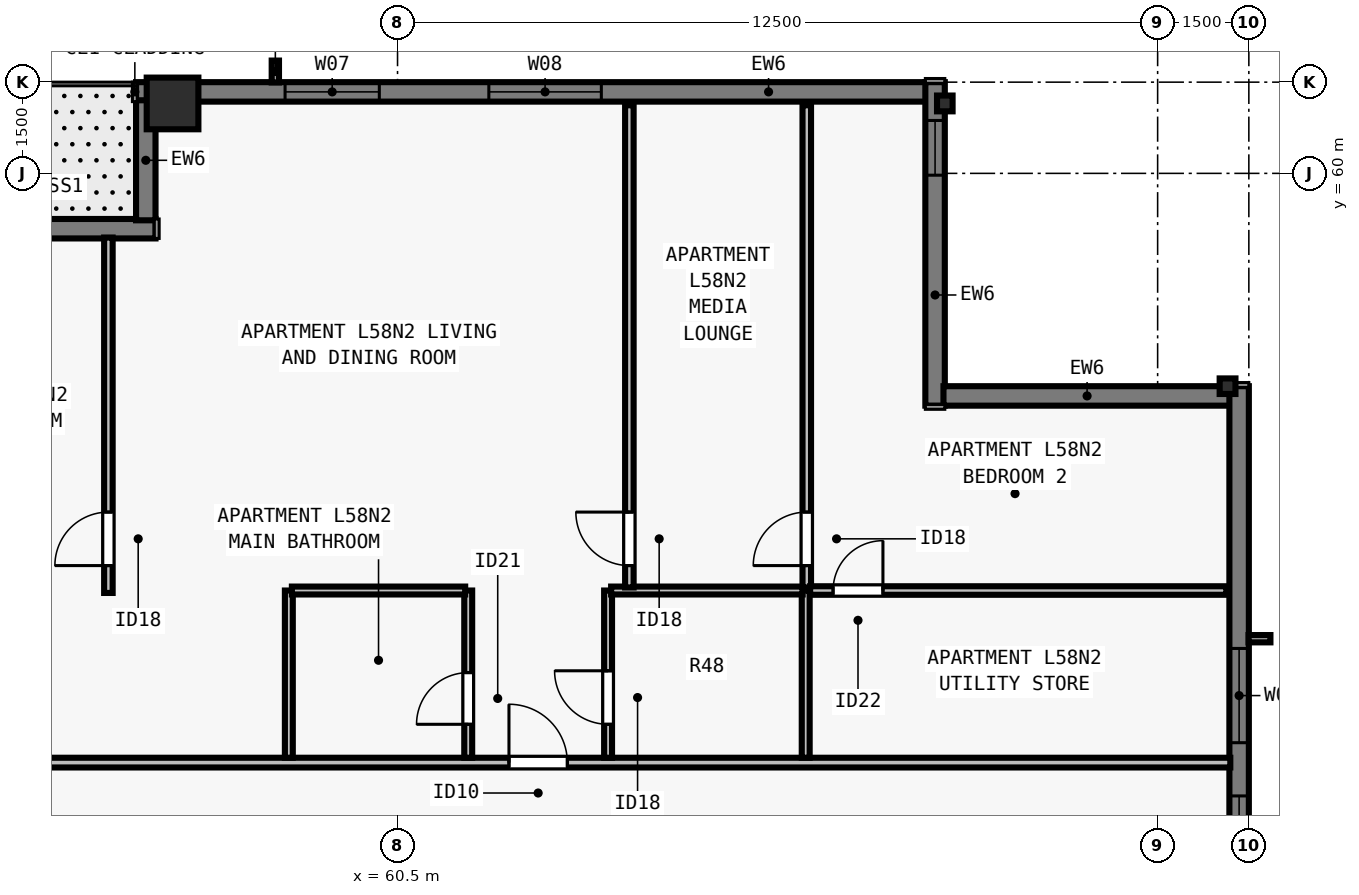
"""IFC4 building model, lengths in metres.
Left out: names, types, materials, properties, quantities, classifications, styles, units other than length and angle.
Written with IfcOpenShell. Run it as: python <this file> out.ifc"""

import sys

from ifc_helpers import new_model, si_unit, direction, frame, frame_2d, origin, origin_2d, place, context, subcontext, project, spatial, rectangle, i_section, extrude, element, fill, save


model = new_model("IFC4")
c1 = context("Model", 3, precision=1e-05, world=origin(), true_north=direction((0.0, 1.0)))
c2 = subcontext(c1, "Body", "Model", "MODEL_VIEW")
j1 = project(units=[si_unit("LENGTHUNIT", "METRE"), si_unit("PLANEANGLEUNIT", "RADIAN")], contexts=[c1])
p1 = place(None, origin())
s1 = spatial("IfcSite", under=j1, at=p1, CompositionType="ELEMENT")
p2 = place(p1, origin())
s2 = spatial("IfcBuilding", under=s1, at=p2, CompositionType="ELEMENT")
p3 = place(p2, frame((0.0, 0.0, 213.0)))
s3 = spatial("IfcBuildingStorey", under=s2, at=p3, CompositionType="ELEMENT", Elevation=213.0)
for number, where, z_axis, x_axis in (
    (1, (74.15, 56.5, 0.0), (0.0, 0.0, 1.0), (0.0, 1.0, 0.0)),
    (2, (69.5, 61.15, 0.0), (0.0, 0.0, 1.0), (1.0, 0.0, 0.0)),
):
    element("IfcColumn", number, at=place(p3, frame(where, z_axis=z_axis, x_axis=x_axis)), inside=s3, PredefinedType="COLUMN", context=c2, shape_type="SweptSolid", body=[
        extrude(i_section(OverallWidth=0.256, OverallDepth=0.26, WebThickness=0.01, FlangeThickness=0.017, FilletRadius=0.013, at=origin_2d()), origin(), (0.0, 0.0, 1.0), 3.5),
    ])
p4 = place(p3, frame((56.8, 61.15, 0.0), z_axis=(0.0, 0.0, 1.0), x_axis=(1.0, 0.0, 0.0)))
e3 = element("IfcColumn", 3, at=p4, inside=s3, PredefinedType="COLUMN", context=c2, shape_type="SweptSolid", body=[
    extrude(rectangle(XDim=0.85, YDim=0.85, at=origin_2d()), origin(), (0.0, 0.0, 1.0), 3.5),
])
p5 = place(p3, frame((56.2, 61.34, 0.0), z_axis=(0.0, 0.0, 1.0), x_axis=(1.0, 0.0, 0.0)))
e4 = element("IfcWall", 4, at=p5, inside=s3, PredefinedType="SOLIDWALL", context=c2, shape_type="SweptSolid", body=[
    extrude(rectangle(XDim=13.002, YDim=0.32, at=frame_2d((6.501, 0.0))), origin(), (0.0, 0.0, 1.0), 3.29),
])
p6 = place(p5, frame((2.45, 0.0, 0.8)))
e5 = element("IfcOpeningElement", 5, at=p6, cuts=e4, PredefinedType="OPENING", context=c2, shape_type="SweptSolid", body=[
    extrude(rectangle(XDim=1.55, YDim=1.678, at=frame_2d((0.775, 0.839))), frame((0.0, 0.17, 0.0), z_axis=(0.0, -1.0, 0.0), x_axis=(1.0, 0.0, 0.0)), (0.0, 0.0, 1.0), 0.34),
])
p7 = place(p5, frame((5.802, 0.0, 0.8)))
e6 = element("IfcOpeningElement", 6, at=p7, cuts=e4, PredefinedType="OPENING", context=c2, shape_type="SweptSolid", body=[
    extrude(rectangle(XDim=1.85, YDim=1.678, at=frame_2d((0.925, 0.839))), frame((0.0, 0.17, 0.0), z_axis=(0.0, -1.0, 0.0), x_axis=(1.0, 0.0, 0.0)), (0.0, 0.0, 1.0), 0.34),
])
p8 = place(p3, frame((69.34, 61.5, 0.0), z_axis=(0.0, 0.0, 1.0), x_axis=(0.0, -1.0, 0.0)))
e7 = element("IfcWall", 7, at=p8, inside=s3, PredefinedType="SOLIDWALL", context=c2, shape_type="SweptSolid", body=[
    extrude(rectangle(XDim=5.32, YDim=0.32, at=frame_2d((2.66, 0.0))), origin(), (0.0, 0.0, 1.0), 3.29),
])
p9 = place(p8, frame((0.63, 0.0, 0.8)))
e8 = element("IfcOpeningElement", 8, at=p9, cuts=e7, PredefinedType="OPENING", context=c2, shape_type="SweptSolid", body=[
    extrude(rectangle(XDim=0.9, YDim=1.678, at=frame_2d((0.45, 0.839))), frame((0.0, 0.17, 0.0), z_axis=(0.0, -1.0, 0.0), x_axis=(1.0, 0.0, 0.0)), (0.0, 0.0, 1.0), 0.34),
])
p10 = place(p3, frame((69.478, 56.34, 0.0), z_axis=(0.0, 0.0, 1.0), x_axis=(1.0, 0.0, 0.0)))
e9 = element("IfcWall", 9, at=p10, inside=s3, PredefinedType="SOLIDWALL", context=c2, shape_type="SweptSolid", body=[
    extrude(rectangle(XDim=4.724, YDim=0.32, at=frame_2d((2.362, 0.0))), origin(), (0.0, 0.0, 1.0), 3.29),
])
p11 = place(p3, frame((74.34, 56.5, 0.0), z_axis=(0.0, 0.0, 1.0), x_axis=(0.0, -1.0, 0.0)))
e10 = element("IfcWall", 10, at=p11, inside=s3, PredefinedType="SOLIDWALL", context=c2, shape_type="SweptSolid", body=[
    extrude(rectangle(XDim=34.702, YDim=0.32, at=frame_2d((17.351, 0.0))), origin(), (0.0, 0.0, 1.0), 3.29),
])
p12 = place(p11, frame((4.312, 0.0, 0.8)))
e11 = element("IfcOpeningElement", 11, at=p12, cuts=e10, PredefinedType="OPENING", context=c2, shape_type="SweptSolid", body=[
    extrude(rectangle(XDim=1.55, YDim=1.678, at=frame_2d((0.775, 0.839))), frame((0.0, 0.17, 0.0), z_axis=(0.0, -1.0, 0.0), x_axis=(1.0, 0.0, 0.0)), (0.0, 0.0, 1.0), 0.34),
])
p13 = place(p11, frame((6.738, 0.0, 0.8)))
e12 = element("IfcOpeningElement", 12, at=p13, cuts=e10, PredefinedType="OPENING", context=c2, shape_type="SweptSolid", body=[
    extrude(rectangle(XDim=1.85, YDim=1.678, at=frame_2d((0.925, 0.839))), frame((0.0, 0.17, 0.0), z_axis=(0.0, -1.0, 0.0), x_axis=(1.0, 0.0, 0.0)), (0.0, 0.0, 1.0), 0.34),
])
p14 = place(p11, frame((10.263, 0.0, 0.8)))
e13 = element("IfcOpeningElement", 13, at=p14, cuts=e10, PredefinedType="OPENING", context=c2, shape_type="SweptSolid", body=[
    extrude(rectangle(XDim=1.55, YDim=1.678, at=frame_2d((0.775, 0.839))), frame((0.0, 0.17, 0.0), z_axis=(0.0, -1.0, 0.0), x_axis=(1.0, 0.0, 0.0)), (0.0, 0.0, 1.0), 0.34),
])
p15 = place(p11, frame((13.488, 0.0, 0.8)))
e14 = element("IfcOpeningElement", 14, at=p15, cuts=e10, PredefinedType="OPENING", context=c2, shape_type="SweptSolid", body=[
    extrude(rectangle(XDim=1.85, YDim=1.678, at=frame_2d((0.925, 0.839))), frame((0.0, 0.17, 0.0), z_axis=(0.0, -1.0, 0.0), x_axis=(1.0, 0.0, 0.0)), (0.0, 0.0, 1.0), 0.34),
])
p16 = place(p11, frame((18.264, 0.0, 0.8)))
e15 = element("IfcOpeningElement", 15, at=p16, cuts=e10, PredefinedType="OPENING", context=c2, shape_type="SweptSolid", body=[
    extrude(rectangle(XDim=1.55, YDim=1.678, at=frame_2d((0.775, 0.839))), frame((0.0, 0.17, 0.0), z_axis=(0.0, -1.0, 0.0), x_axis=(1.0, 0.0, 0.0)), (0.0, 0.0, 1.0), 0.34),
])
p17 = place(p11, frame((24.164, 0.0, 0.8)))
e16 = element("IfcOpeningElement", 16, at=p17, cuts=e10, PredefinedType="OPENING", context=c2, shape_type="SweptSolid", body=[
    extrude(rectangle(XDim=1.55, YDim=1.678, at=frame_2d((0.775, 0.839))), frame((0.0, 0.17, 0.0), z_axis=(0.0, -1.0, 0.0), x_axis=(1.0, 0.0, 0.0)), (0.0, 0.0, 1.0), 0.34),
])
p18 = place(p3, frame((49.378, 59.09, 0.0), z_axis=(0.0, 0.0, 1.0), x_axis=(1.0, 0.0, 0.0)))
e17 = element("IfcWall", 17, at=p18, inside=s3, PredefinedType="SOLIDWALL", context=c2, shape_type="SweptSolid", body=[
    extrude(rectangle(XDim=7.142, YDim=0.32, at=frame_2d((3.571, 0.0))), origin(), (0.0, 0.0, 1.0), 3.29),
])
p19 = place(p18, frame((3.767, 0.0, 0.0)))
e18 = element("IfcOpeningElement", 18, at=p19, cuts=e17, PredefinedType="OPENING", context=c2, shape_type="SweptSolid", body=[
    extrude(rectangle(XDim=1.0, YDim=2.15, at=frame_2d((0.5, 1.075))), frame((0.0, 0.17, 0.0), z_axis=(0.0, -1.0, 0.0), x_axis=(1.0, 0.0, 0.0)), (0.0, 0.0, 1.0), 0.34),
])
p20 = place(p3, frame((56.36, 59.228, 0.0), z_axis=(0.0, 0.0, 1.0), x_axis=(0.0, 1.0, 0.0)))
e19 = element("IfcWall", 19, at=p20, inside=s3, PredefinedType="SOLIDWALL", context=c2, shape_type="SweptSolid", body=[
    extrude(rectangle(XDim=1.974, YDim=0.32, at=frame_2d((0.987, 0.0))), origin(), (0.0, 0.0, 1.0), 3.29),
])
p21 = place(p3, frame((29.805, 50.31, 0.0), z_axis=(0.0, 0.0, 1.0), x_axis=(1.0, 0.0, 0.0)))
e20 = element("IfcWall", 20, at=p21, inside=s3, PredefinedType="PARTITIONING", context=c2, shape_type="SweptSolid", body=[
    extrude(rectangle(XDim=44.39, YDim=0.16, at=frame_2d((22.195, 0.0))), origin(), (0.0, 0.0, 1.0), 2.958),
])
p22 = place(p21, frame((10.448, 0.0, 0.0)))
e21 = element("IfcOpeningElement", 21, at=p22, cuts=e20, PredefinedType="OPENING", context=c2, shape_type="SweptSolid", body=[
    extrude(rectangle(XDim=0.96, YDim=2.18, at=frame_2d((0.48, 1.09))), frame((0.0, 0.09, 0.0), z_axis=(0.0, -1.0, 0.0), x_axis=(1.0, 0.0, 0.0)), (0.0, 0.0, 1.0), 0.18),
])
p23 = place(p21, frame((32.528, 0.0, 0.0)))
e22 = element("IfcOpeningElement", 22, at=p23, cuts=e20, PredefinedType="OPENING", context=c2, shape_type="SweptSolid", body=[
    extrude(rectangle(XDim=0.96, YDim=2.18, at=frame_2d((0.48, 1.09))), frame((0.0, 0.09, 0.0), z_axis=(0.0, -1.0, 0.0), x_axis=(1.0, 0.0, 0.0)), (0.0, 0.0, 1.0), 0.18),
])
p24 = place(p3, frame((58.712, 50.39, 0.0), z_axis=(0.0, 0.0, 1.0), x_axis=(0.0, 1.0, 0.0)))
e23 = element("IfcWall", 23, at=p24, inside=s3, PredefinedType="PLUMBINGWALL", context=c2, shape_type="SweptSolid", body=[
    extrude(rectangle(XDim=2.75, YDim=0.13, at=frame_2d((1.375, 0.0))), origin(), (0.0, 0.0, 1.0), 3.29),
])
p25 = place(p3, frame((61.663, 50.39, 0.0), z_axis=(0.0, 0.0, 1.0), x_axis=(0.0, 1.0, 0.0)))
e24 = element("IfcWall", 24, at=p25, inside=s3, PredefinedType="PLUMBINGWALL", context=c2, shape_type="SweptSolid", body=[
    extrude(rectangle(XDim=2.75, YDim=0.13, at=frame_2d((1.375, 0.0))), origin(), (0.0, 0.0, 1.0), 3.29),
])
p26 = place(p25, frame((0.55, 0.0, 0.0)))
e25 = element("IfcOpeningElement", 25, at=p26, cuts=e24, PredefinedType="OPENING", context=c2, shape_type="SweptSolid", body=[
    extrude(rectangle(XDim=0.85, YDim=2.08, at=frame_2d((0.425, 1.04))), frame((0.0, 0.075, 0.0), z_axis=(0.0, -1.0, 0.0), x_axis=(1.0, 0.0, 0.0)), (0.0, 0.0, 1.0), 0.15),
])
p27 = place(p3, frame((58.762, 53.14, 0.0), z_axis=(0.0, 0.0, 1.0), x_axis=(1.0, 0.0, 0.0)))
e26 = element("IfcWall", 26, at=p27, inside=s3, PredefinedType="PLUMBINGWALL", context=c2, shape_type="SweptSolid", body=[
    extrude(rectangle(XDim=2.85, YDim=0.13, at=frame_2d((1.425, 0.0))), origin(), (0.0, 0.0, 1.0), 3.29),
])
p28 = place(p3, frame((67.212, 50.39, 0.0), z_axis=(0.0, 0.0, 1.0), x_axis=(0.0, 1.0, 0.0)))
e27 = element("IfcWall", 27, at=p28, inside=s3, PredefinedType="PLUMBINGWALL", context=c2, shape_type="SweptSolid", body=[
    extrude(rectangle(XDim=2.75, YDim=0.13, at=frame_2d((1.375, 0.0))), origin(), (0.0, 0.0, 1.0), 3.29),
])
p29 = place(p3, frame((63.962, 50.39, 0.0), z_axis=(0.0, 0.0, 1.0), x_axis=(0.0, 1.0, 0.0)))
e28 = element("IfcWall", 28, at=p29, inside=s3, PredefinedType="PLUMBINGWALL", context=c2, shape_type="SweptSolid", body=[
    extrude(rectangle(XDim=2.75, YDim=0.13, at=frame_2d((1.375, 0.0))), origin(), (0.0, 0.0, 1.0), 2.573),
])
p30 = place(p29, frame((0.55, 0.0, 0.0)))
e29 = element("IfcOpeningElement", 29, at=p30, cuts=e28, PredefinedType="OPENING", context=c2, shape_type="SweptSolid", body=[
    extrude(rectangle(XDim=0.88, YDim=2.1, at=frame_2d((0.44, 1.05))), frame((0.0, 0.075, 0.0), z_axis=(0.0, -1.0, 0.0), x_axis=(1.0, 0.0, 0.0)), (0.0, 0.0, 1.0), 0.15),
])
p31 = place(p3, frame((64.012, 53.14, 0.0), z_axis=(0.0, 0.0, 1.0), x_axis=(1.0, 0.0, 0.0)))
e30 = element("IfcWall", 30, at=p31, inside=s3, PredefinedType="PLUMBINGWALL", context=c2, shape_type="SweptSolid", body=[
    extrude(rectangle(XDim=3.15, YDim=0.13, at=frame_2d((1.575, 0.0))), origin(), (0.0, 0.0, 1.0), 3.29),
])
p32 = place(p3, frame((55.745, 53.1, 0.0), z_axis=(0.0, 0.0, 1.0), x_axis=(0.0, 1.0, 0.0)))
e31 = element("IfcWall", 31, at=p32, inside=s3, PredefinedType="PARTITIONING", context=c2, shape_type="SweptSolid", body=[
    extrude(rectangle(XDim=5.845, YDim=0.14, at=frame_2d((2.922, 0.0))), origin(), (0.0, 0.0, 1.0), 3.29),
])
p33 = place(p32, frame((0.45, 0.0, 0.0)))
e32 = element("IfcOpeningElement", 32, at=p33, cuts=e31, PredefinedType="OPENING", context=c2, shape_type="SweptSolid", body=[
    extrude(rectangle(XDim=0.88, YDim=2.1, at=frame_2d((0.44, 1.05))), frame((0.0, 0.08, 0.0), z_axis=(0.0, -1.0, 0.0), x_axis=(1.0, 0.0, 0.0)), (0.0, 0.0, 1.0), 0.16),
])
p34 = place(p3, frame((67.23, 53.19, 0.0), z_axis=(0.0, 0.0, 1.0), x_axis=(0.0, 1.0, 0.0)))
e33 = element("IfcWall", 33, at=p34, inside=s3, PredefinedType="PARTITIONING", context=c2, shape_type="SweptSolid", body=[
    extrude(rectangle(XDim=7.93, YDim=0.14, at=frame_2d((3.965, 0.0))), origin(), (0.0, 0.0, 1.0), 2.573),
])
p35 = place(p34, frame((0.36, 0.0, 0.0)))
e34 = element("IfcOpeningElement", 34, at=p35, cuts=e33, PredefinedType="OPENING", context=c2, shape_type="SweptSolid", body=[
    extrude(rectangle(XDim=0.88, YDim=2.1, at=frame_2d((0.44, 1.05))), frame((0.0, 0.08, 0.0), z_axis=(0.0, -1.0, 0.0), x_axis=(1.0, 0.0, 0.0)), (0.0, 0.0, 1.0), 0.16),
])
p36 = place(p3, frame((67.285, 53.14, 0.0), z_axis=(0.0, 0.0, 1.0), x_axis=(1.0, 0.0, 0.0)))
e35 = element("IfcWall", 35, at=p36, inside=s3, PredefinedType="PARTITIONING", context=c2, shape_type="SweptSolid", body=[
    extrude(rectangle(XDim=6.845, YDim=0.14, at=frame_2d((3.422, 0.0))), origin(), (0.0, 0.0, 1.0), 2.958),
])
p37 = place(p36, frame((0.377, 0.0, 0.0)))
e36 = element("IfcOpeningElement", 36, at=p37, cuts=e35, PredefinedType="OPENING", context=c2, shape_type="SweptSolid", body=[
    extrude(rectangle(XDim=0.82, YDim=2.1, at=frame_2d((0.41, 1.05))), frame((0.0, 0.08, 0.0), z_axis=(0.0, -1.0, 0.0), x_axis=(1.0, 0.0, 0.0)), (0.0, 0.0, 1.0), 0.16),
])
p38 = place(p3, frame((64.312, 53.19, 0.0), z_axis=(0.0, 0.0, 1.0), x_axis=(0.0, 1.0, 0.0)))
e37 = element("IfcWall", 37, at=p38, inside=s3, PredefinedType="PARTITIONING", context=c2, shape_type="SweptSolid", body=[
    extrude(rectangle(XDim=7.93, YDim=0.14, at=frame_2d((3.965, 0.0))), origin(), (0.0, 0.0, 1.0), 2.573),
])
p39 = place(p38, frame((0.36, 0.0, 0.0)))
e38 = element("IfcOpeningElement", 38, at=p39, cuts=e37, PredefinedType="OPENING", context=c2, shape_type="SweptSolid", body=[
    extrude(rectangle(XDim=0.88, YDim=2.1, at=frame_2d((0.44, 1.05))), frame((0.0, 0.08, 0.0), z_axis=(0.0, -1.0, 0.0), x_axis=(1.0, 0.0, 0.0)), (0.0, 0.0, 1.0), 0.16),
])
p40 = place(p6, origin())
e39 = element("IfcWindow", 39, at=p40, inside=s3, PartitioningType="SINGLE_PANEL", PredefinedType="WINDOW", context=c2, shape_type="SweptSolid", body=[
    extrude(rectangle(XDim=1.55, YDim=1.678, at=frame_2d((0.775, 0.839))), frame((0.0, -0.05, 0.0), z_axis=(0.0, -1.0, 0.0), x_axis=(1.0, 0.0, 0.0)), (0.0, 0.0, 1.0), 0.06),
])
fill(e5, e39)
p41 = place(p7, origin())
e40 = element("IfcWindow", 40, at=p41, inside=s3, PartitioningType="SINGLE_PANEL", PredefinedType="WINDOW", context=c2, shape_type="SweptSolid", body=[
    extrude(rectangle(XDim=1.85, YDim=1.678, at=frame_2d((0.925, 0.839))), frame((0.0, -0.05, 0.0), z_axis=(0.0, -1.0, 0.0), x_axis=(1.0, 0.0, 0.0)), (0.0, 0.0, 1.0), 0.06),
])
fill(e6, e40)
p42 = place(p12, origin())
e41 = element("IfcWindow", 41, at=p42, inside=s3, PartitioningType="SINGLE_PANEL", PredefinedType="WINDOW", context=c2, shape_type="SweptSolid", body=[
    extrude(rectangle(XDim=1.55, YDim=1.678, at=frame_2d((0.775, 0.839))), frame((0.0, -0.05, 0.0), z_axis=(0.0, -1.0, 0.0), x_axis=(1.0, 0.0, 0.0)), (0.0, 0.0, 1.0), 0.06),
])
fill(e11, e41)
p43 = place(p13, origin())
e42 = element("IfcWindow", 42, at=p43, inside=s3, PartitioningType="SINGLE_PANEL", PredefinedType="WINDOW", context=c2, shape_type="SweptSolid", body=[
    extrude(rectangle(XDim=1.85, YDim=1.678, at=frame_2d((0.925, 0.839))), frame((0.0, -0.05, 0.0), z_axis=(0.0, -1.0, 0.0), x_axis=(1.0, 0.0, 0.0)), (0.0, 0.0, 1.0), 0.06),
])
fill(e12, e42)
p44 = place(p9, origin())
e43 = element("IfcWindow", 43, at=p44, inside=s3, PartitioningType="SINGLE_PANEL", PredefinedType="WINDOW", context=c2, shape_type="SweptSolid", body=[
    extrude(rectangle(XDim=0.9, YDim=1.678, at=frame_2d((0.45, 0.839))), frame((0.0, -0.04, 0.0), z_axis=(0.0, -1.0, 0.0), x_axis=(1.0, 0.0, 0.0)), (0.0, 0.0, 1.0), 0.06),
])
fill(e8, e43)
p45 = place(p26, origin())
e44 = element("IfcDoor", 44, at=p45, inside=s3, OperationType="SINGLE_SWING_LEFT", PredefinedType="DOOR", context=c2, shape_type="SweptSolid", body=[
    extrude(rectangle(XDim=0.85, YDim=2.08, at=frame_2d((0.425, 1.04))), frame((0.0, 0.025, 0.0), z_axis=(0.0, -1.0, 0.0), x_axis=(1.0, 0.0, 0.0)), (0.0, 0.0, 1.0), 0.05),
])
fill(e25, e44)
p46 = place(p30, origin())
e45 = element("IfcDoor", 45, at=p46, inside=s3, OperationType="SINGLE_SWING_RIGHT", PredefinedType="DOOR", context=c2, shape_type="SweptSolid", body=[
    extrude(rectangle(XDim=0.88, YDim=2.1, at=frame_2d((0.44, 1.05))), frame((0.0, 0.025, 0.0), z_axis=(0.0, -1.0, 0.0), x_axis=(1.0, 0.0, 0.0)), (0.0, 0.0, 1.0), 0.05),
])
fill(e29, e45)
p47 = place(p33, origin())
e46 = element("IfcDoor", 46, at=p47, inside=s3, OperationType="SINGLE_SWING_LEFT", PredefinedType="DOOR", context=c2, shape_type="SweptSolid", body=[
    extrude(rectangle(XDim=0.88, YDim=2.1, at=frame_2d((0.44, 1.05))), frame((0.0, 0.025, 0.0), z_axis=(0.0, -1.0, 0.0), x_axis=(1.0, 0.0, 0.0)), (0.0, 0.0, 1.0), 0.05),
])
fill(e32, e46)
p48 = place(p37, origin())
e47 = element("IfcDoor", 47, at=p48, inside=s3, OperationType="SINGLE_SWING_RIGHT", PredefinedType="DOOR", context=c2, shape_type="SweptSolid", body=[
    extrude(rectangle(XDim=0.82, YDim=2.1, at=frame_2d((0.41, 1.05))), frame((0.0, 0.025, 0.0), z_axis=(0.0, -1.0, 0.0), x_axis=(1.0, 0.0, 0.0)), (0.0, 0.0, 1.0), 0.05),
])
fill(e36, e47)
p49 = place(p35, origin())
e48 = element("IfcDoor", 48, at=p49, inside=s3, OperationType="SINGLE_SWING_LEFT", PredefinedType="DOOR", context=c2, shape_type="SweptSolid", body=[
    extrude(rectangle(XDim=0.88, YDim=2.1, at=frame_2d((0.44, 1.05))), frame((0.0, 0.025, 0.0), z_axis=(0.0, -1.0, 0.0), x_axis=(1.0, 0.0, 0.0)), (0.0, 0.0, 1.0), 0.05),
])
fill(e34, e48)
p50 = place(p39, origin())
e49 = element("IfcDoor", 49, at=p50, inside=s3, OperationType="SINGLE_SWING_RIGHT", PredefinedType="DOOR", context=c2, shape_type="SweptSolid", body=[
    extrude(rectangle(XDim=0.88, YDim=2.1, at=frame_2d((0.44, 1.05))), frame((0.0, 0.025, 0.0), z_axis=(0.0, -1.0, 0.0), x_axis=(1.0, 0.0, 0.0)), (0.0, 0.0, 1.0), 0.05),
])
fill(e38, e49)
p51 = place(p23, origin())
e50 = element("IfcDoor", 50, at=p51, inside=s3, OperationType="SINGLE_SWING_LEFT", PredefinedType="DOOR", context=c2, shape_type="SweptSolid", body=[
    extrude(rectangle(XDim=0.96, YDim=2.18, at=frame_2d((0.48, 1.09))), frame((0.0, 0.025, 0.0), z_axis=(0.0, -1.0, 0.0), x_axis=(1.0, 0.0, 0.0)), (0.0, 0.0, 1.0), 0.05),
])
fill(e22, e50)
save(model, sys.argv[1])
